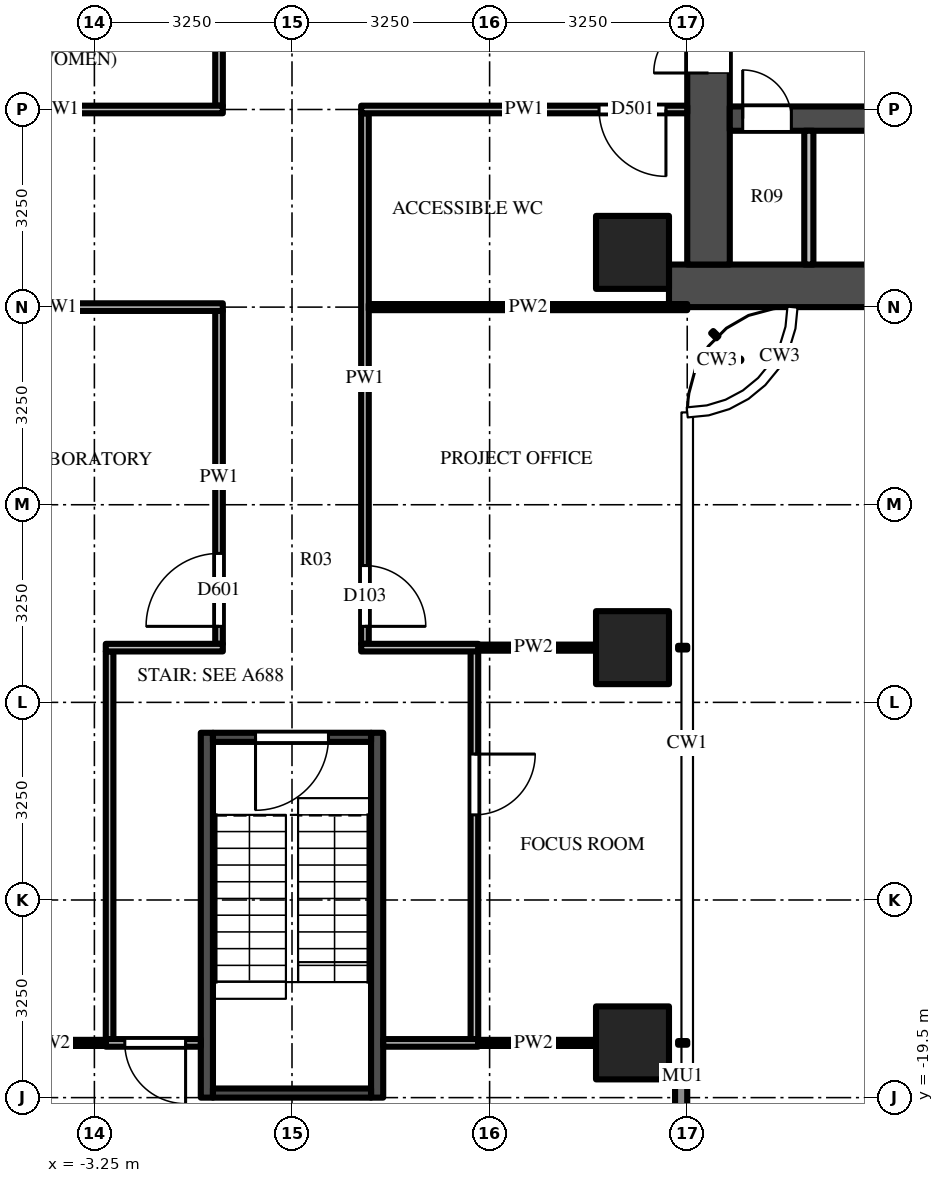
"""IFC4 building model, lengths in metres.
Left out: names, types, materials, properties, quantities, classifications, styles, units other than length and angle.
Written with IfcOpenShell. Run it as: python <this file> out.ifc"""

import sys

from ifc_helpers import new_model, si_unit, direction, frame, frame_2d, origin, origin_2d, place, context, subcontext, project, spatial, rectangle, extrude, source, transform, mapped, element, fill, save


model = new_model("IFC4")
c1 = context("Model", 3, precision=1e-05, world=origin(), true_north=direction((0.0, 1.0)))
c2 = subcontext(c1, "Body", "Model", "MODEL_VIEW")
j1 = project(units=[si_unit("LENGTHUNIT", "METRE"), si_unit("PLANEANGLEUNIT", "RADIAN")], contexts=[c1])
p1 = place(None, origin())
s1 = spatial("IfcSite", under=j1, at=p1, CompositionType="ELEMENT")
p2 = place(p1, origin())
s2 = spatial("IfcBuilding", under=s1, at=p2, CompositionType="ELEMENT")
p3 = place(p2, frame((0.0, 0.0, 197.1)))
s3 = spatial("IfcBuildingStorey", under=s2, at=p3, CompositionType="ELEMENT", Elevation=197.1)
m1 = source(origin(), c2, "Body", "SweptSolid", [
    extrude(rectangle(XDim=1.2, YDim=1.2, at=origin_2d()), origin(), (0.0, 0.0, 1.0), 3.9),
])
for number, where, z_axis, x_axis in (
    (1, (5.6, -5.6, 0.0), (0.0, 0.0, 1.0), (1.0, 0.0, 0.0)),
    (2, (5.6, -12.1, 0.0), (0.0, 0.0, 1.0), (1.0, 0.0, 0.0)),
    (3, (5.6, -18.6, 0.0), (0.0, 0.0, 1.0), (1.0, 0.0, 0.0)),
):
    element("IfcColumn", number, at=place(p3, frame(where, z_axis=z_axis, x_axis=x_axis)), inside=s3, PredefinedType="COLUMN", context=c2, shape_type="MappedRepresentation", body=[
        mapped(m1, transform((0.0, 0.0, 0.0))),
    ])
m2 = source(origin(), c2, "Body", "SweptSolid", [
    extrude(rectangle(XDim=16.55, YDim=0.7, at=frame_2d((8.275, 0.0))), origin(), (0.0, 0.0, 1.0), 3.7),
])
p4 = place(p3, frame((6.2, -6.15, 0.0), z_axis=(0.0, 0.0, 1.0), x_axis=(1.0, 0.0, 0.0)))
e4 = element("IfcWall", 4, at=p4, inside=s3, PredefinedType="SHEAR", context=c2, shape_type="MappedRepresentation", body=[
    mapped(m2, transform((0.0, 0.0, 0.0))),
])
m3 = source(origin(), c2, "Body", "SweptSolid", [
    extrude(rectangle(XDim=9.05, YDim=0.7, at=frame_2d((4.525, 0.0))), origin(), (0.0, 0.0, 1.0), 3.7),
])
p5 = place(p3, frame((6.85, -5.8, 0.0), z_axis=(0.0, 0.0, 1.0), x_axis=(0.0, 1.0, 0.0)))
e5 = element("IfcWall", 5, at=p5, inside=s3, PredefinedType="SHEAR", context=c2, shape_type="MappedRepresentation", body=[
    mapped(m3, transform((0.0, 0.0, 0.0))),
])
m4 = source(origin(), c2, "Body", "SweptSolid", [
    extrude(rectangle(XDim=1.8, YDim=2.1, at=frame_2d((0.9, 1.05))), frame((0.0, 0.36, 0.0), z_axis=(0.0, -1.0, 0.0), x_axis=(1.0, 0.0, 0.0)), (0.0, 0.0, 1.0), 0.72),
])
p6 = place(p5, frame((3.15, 0.0, 0.0)))
e6 = element("IfcOpeningElement", 6, at=p6, cuts=e5, PredefinedType="OPENING", context=c2, shape_type="MappedRepresentation", body=[
    mapped(m4, transform((0.0, 0.0, 0.0))),
])
m5 = source(origin(), c2, "Body", "SweptSolid", [
    extrude(rectangle(XDim=7.5, YDim=0.4, at=frame_2d((3.75, 0.0))), origin(), (0.0, 0.0, 1.0), 3.7),
])
p7 = place(p3, frame((7.2, -3.4, 0.0), z_axis=(0.0, 0.0, 1.0), x_axis=(1.0, 0.0, 0.0)))
e7 = element("IfcWall", 7, at=p7, inside=s3, PredefinedType="SHEAR", context=c2, shape_type="MappedRepresentation", body=[
    mapped(m5, transform((0.0, 0.0, 0.0))),
])
m6 = source(origin(), c2, "Body", "SweptSolid", [
    extrude(rectangle(XDim=0.8, YDim=2.1, at=frame_2d((0.4, 1.05))), frame((0.0, 0.21, 0.0), z_axis=(0.0, -1.0, 0.0), x_axis=(1.0, 0.0, 0.0)), (0.0, 0.0, 1.0), 0.42),
])
p8 = place(p7, frame((0.212, 0.0, 0.0)))
e8 = element("IfcOpeningElement", 8, at=p8, cuts=e7, PredefinedType="OPENING", context=c2, shape_type="MappedRepresentation", body=[
    mapped(m6, transform((0.0, 0.0, 0.0))),
])
m7 = source(origin(), c2, "Body", "SweptSolid", [
    extrude(rectangle(XDim=1.0, YDim=2.1, at=frame_2d((0.5, 1.05))), frame((0.0, 0.21, 0.0), z_axis=(0.0, -1.0, 0.0), x_axis=(1.0, 0.0, 0.0)), (0.0, 0.0, 1.0), 0.42),
])
p9 = place(p7, frame((3.05, 0.0, 0.0)))
e9 = element("IfcOpeningElement", 9, at=p9, cuts=e7, PredefinedType="OPENING", context=c2, shape_type="MappedRepresentation", body=[
    mapped(m7, transform((0.0, 0.0, 0.0))),
])
p10 = place(p7, frame((6.087, 0.0, 0.0)))
e10 = element("IfcOpeningElement", 10, at=p10, cuts=e7, PredefinedType="OPENING", context=c2, shape_type="MappedRepresentation", body=[
    mapped(m6, transform((0.0, 0.0, 0.0))),
])
m8 = source(origin(), c2, "Body", "SweptSolid", [
    extrude(rectangle(XDim=2.2, YDim=0.15, at=frame_2d((1.1, 0.0))), origin(), (0.0, 0.0, 1.0), 3.7),
])
p11 = place(p3, frame((8.5, -5.8, 0.0), z_axis=(0.0, 0.0, 1.0), x_axis=(0.0, 1.0, 0.0)))
e11 = element("IfcWall", 11, at=p11, inside=s3, PredefinedType="PARTITIONING", context=c2, shape_type="MappedRepresentation", body=[
    mapped(m8, transform((0.0, 0.0, 0.0))),
])
m9 = source(origin(), c2, "Body", "SweptSolid", [
    extrude(rectangle(XDim=6.0, YDim=0.2, at=frame_2d((3.0, 0.0))), origin(), (0.0, 0.0, 1.0), 3.7),
])
for number, where, z_axis, x_axis in (
    (12, (1.4, -13.5, 0.0), (0.0, 0.0, 1.0), (0.0, -1.0, 0.0)),
    (13, (-1.4, -13.5, 0.0), (0.0, 0.0, 1.0), (0.0, -1.0, 0.0)),
):
    element("IfcWall", number, at=place(p3, frame(where, z_axis=z_axis, x_axis=x_axis)), inside=s3, PredefinedType="SHEAR", context=c2, shape_type="MappedRepresentation", body=[
        mapped(m9, transform((0.0, 0.0, 0.0))),
    ])
m10 = source(origin(), c2, "Body", "SweptSolid", [
    extrude(rectangle(XDim=2.6, YDim=0.15, at=frame_2d((1.3, 0.0))), origin(), (0.0, 0.0, 1.0), 3.7),
])
p12 = place(p3, frame((1.3, -13.575, 0.0), z_axis=(0.0, 0.0, 1.0), x_axis=(-1.0, 0.0, 0.0)))
e14 = element("IfcWall", 14, at=p12, inside=s3, PredefinedType="SHEAR", context=c2, shape_type="MappedRepresentation", body=[
    mapped(m10, transform((0.0, 0.0, 0.0))),
])
m11 = source(origin(), c2, "Body", "SweptSolid", [
    extrude(rectangle(XDim=1.2, YDim=2.1, at=frame_2d((0.6, 1.05))), frame((0.0, 0.085, 0.0), z_axis=(0.0, -1.0, 0.0), x_axis=(1.0, 0.0, 0.0)), (0.0, 0.0, 1.0), 0.17),
])
p13 = place(p12, frame((0.7, 0.0, 0.0)))
e15 = element("IfcOpeningElement", 15, at=p13, cuts=e14, PredefinedType="OPENING", context=c2, shape_type="MappedRepresentation", body=[
    mapped(m11, transform((0.0, 0.0, 0.0))),
])
p14 = place(p3, frame((1.3, -19.425, 0.0), z_axis=(0.0, 0.0, 1.0), x_axis=(-1.0, 0.0, 0.0)))
e16 = element("IfcWall", 16, at=p14, inside=s3, PredefinedType="SHEAR", context=c2, shape_type="MappedRepresentation", body=[
    mapped(m10, transform((0.0, 0.0, 0.0))),
])
m12 = source(origin(), c2, "Body", "SweptSolid", [
    extrude(rectangle(XDim=3.0, YDim=0.2, at=frame_2d((1.5, 0.0))), origin(), (0.0, 0.0, 1.0), 3.7),
])
p15 = place(p3, frame((6.4, -22.175, 0.0), z_axis=(0.0, 0.0, 1.0), x_axis=(0.0, 1.0, 0.0)))
e17 = element("IfcWall", 17, at=p15, inside=s3, PredefinedType="SOLIDWALL", context=c2, shape_type="MappedRepresentation", body=[
    mapped(m12, transform((0.0, 0.0, 0.0))),
])
m13 = source(origin(), c2, "Body", "SweptSolid", [
    extrude(rectangle(XDim=1.8, YDim=2.4, at=frame_2d((0.9, 1.2))), frame((0.0, 0.11, 0.0), z_axis=(0.0, -1.0, 0.0), x_axis=(1.0, 0.0, 0.0)), (0.0, 0.0, 1.0), 0.22),
])
p16 = place(p15, frame((0.6, 0.0, 0.0)))
e18 = element("IfcOpeningElement", 18, at=p16, cuts=e17, PredefinedType="OPENING", context=c2, shape_type="MappedRepresentation", body=[
    mapped(m13, transform((0.0, 0.0, 0.0))),
])
m14 = source(origin(), c2, "Body", "SweptSolid", [
    extrude(rectangle(XDim=6.387, YDim=0.125, at=frame_2d((3.194, 0.0))), origin(), (0.0, 0.0, 1.0), 2.997),
])
p17 = place(p3, frame((-3.0, -18.55, 0.0), z_axis=(0.0, 0.0, 1.0), x_axis=(0.0, 1.0, 0.0)))
e19 = element("IfcWall", 19, at=p17, inside=s3, PredefinedType="PARTITIONING", context=c2, shape_type="MappedRepresentation", body=[
    mapped(m14, transform((0.0, 0.0, 0.0))),
])
m15 = source(origin(), c2, "Body", "SweptSolid", [
    extrude(rectangle(XDim=3.125, YDim=0.125, at=frame_2d((1.562, 0.0))), origin(), (0.0, 0.0, 1.0), 3.068),
])
p18 = place(p3, frame((-1.2, -0.062, 0.0), z_axis=(0.0, 0.0, 1.0), x_axis=(0.0, -1.0, 0.0)))
e20 = element("IfcWall", 20, at=p18, inside=s3, PredefinedType="PARTITIONING", context=c2, shape_type="MappedRepresentation", body=[
    mapped(m15, transform((0.0, 0.0, 0.0))),
])
m16 = source(origin(), c2, "Body", "SweptSolid", [
    extrude(rectangle(XDim=5.475, YDim=0.125, at=frame_2d((2.738, 0.0))), origin(), (0.0, 0.0, 1.0), 2.997),
])
p19 = place(p3, frame((-1.2, -12.038, 0.0), z_axis=(0.0, 0.0, 1.0), x_axis=(0.0, 1.0, 0.0)))
e21 = element("IfcWall", 21, at=p19, inside=s3, PredefinedType="PARTITIONING", context=c2, shape_type="MappedRepresentation", body=[
    mapped(m16, transform((0.0, 0.0, 0.0))),
])
m17 = source(origin(), c2, "Body", "SweptSolid", [
    extrude(rectangle(XDim=1.2, YDim=2.1, at=frame_2d((0.6, 1.05))), frame((0.0, 0.073, 0.0), z_axis=(0.0, -1.0, 0.0), x_axis=(1.0, 0.0, 0.0)), (0.0, 0.0, 1.0), 0.145),
])
p20 = place(p19, frame((0.288, 0.0, 0.0)))
e22 = element("IfcOpeningElement", 22, at=p20, cuts=e21, PredefinedType="OPENING", context=c2, shape_type="MappedRepresentation", body=[
    mapped(m17, transform((0.0, 0.0, 0.0))),
])
m18 = source(origin(), c2, "Body", "SweptSolid", [
    extrude(rectangle(XDim=8.725, YDim=0.125, at=frame_2d((4.363, 0.0))), origin(), (0.0, 0.0, 1.0), 2.997),
])
p21 = place(p3, frame((1.2, -3.312, 0.0), z_axis=(0.0, 0.0, 1.0), x_axis=(0.0, -1.0, 0.0)))
e23 = element("IfcWall", 23, at=p21, inside=s3, PredefinedType="PARTITIONING", context=c2, shape_type="MappedRepresentation", body=[
    mapped(m18, transform((0.0, 0.0, 0.0))),
])
m19 = source(origin(), c2, "Body", "SweptSolid", [
    extrude(rectangle(XDim=1.0, YDim=2.1, at=frame_2d((0.5, 1.05))), frame((0.0, 0.073, 0.0), z_axis=(0.0, -1.0, 0.0), x_axis=(1.0, 0.0, 0.0)), (0.0, 0.0, 1.0), 0.145),
])
p22 = place(p21, frame((7.438, 0.0, 0.0)))
e24 = element("IfcOpeningElement", 24, at=p22, cuts=e23, PredefinedType="OPENING", context=c2, shape_type="MappedRepresentation", body=[
    mapped(m19, transform((0.0, 0.0, 0.0))),
])
m20 = source(origin(), c2, "Body", "SweptSolid", [
    extrude(rectangle(XDim=6.4, YDim=0.125, at=frame_2d((3.2, 0.0))), origin(), (0.0, 0.0, 1.0), 2.997),
])
p23 = place(p3, frame((3.0, -12.15, 0.0), z_axis=(0.0, 0.0, 1.0), x_axis=(0.0, -1.0, 0.0)))
e25 = element("IfcWall", 25, at=p23, inside=s3, PredefinedType="PARTITIONING", context=c2, shape_type="MappedRepresentation", body=[
    mapped(m20, transform((0.0, 0.0, 0.0))),
])
p24 = place(p23, frame((1.7, 0.0, 0.0)))
e26 = element("IfcOpeningElement", 26, at=p24, cuts=e25, PredefinedType="OPENING", context=c2, shape_type="MappedRepresentation", body=[
    mapped(m19, transform((0.0, 0.0, 0.0))),
])
m21 = source(origin(), c2, "Body", "SweptSolid", [
    extrude(rectangle(XDim=2.062, YDim=0.1, at=frame_2d((1.031, 0.0))), origin(), (0.0, 0.0, 1.0), 3.223),
])
for number, where, z_axis, x_axis in (
    (27, (-5.0, -18.6, 0.0), (0.0, 0.0, 1.0), (1.0, 0.0, 0.0)),
    (28, (2.938, -18.6, 0.0), (0.0, 0.0, 1.0), (1.0, 0.0, 0.0)),
):
    element("IfcWall", number, at=place(p3, frame(where, z_axis=z_axis, x_axis=x_axis)), inside=s3, PredefinedType="PARTITIONING", context=c2, shape_type="MappedRepresentation", body=[
        mapped(m21, transform((0.0, 0.0, 0.0))),
    ])
m22 = source(origin(), c2, "Body", "SweptSolid", [
    extrude(rectangle(XDim=1.562, YDim=0.125, at=frame_2d((0.781, 0.0))), origin(), (0.0, 0.0, 1.0), 3.223),
])
p25 = place(p3, frame((-1.5, -18.6, 0.0), z_axis=(0.0, 0.0, 1.0), x_axis=(-1.0, 0.0, 0.0)))
e29 = element("IfcWall", 29, at=p25, inside=s3, PredefinedType="PARTITIONING", context=c2, shape_type="MappedRepresentation", body=[
    mapped(m22, transform((0.0, 0.0, 0.0))),
])
p26 = place(p25, frame((0.25, 0.0, 0.0)))
e30 = element("IfcOpeningElement", 30, at=p26, cuts=e29, PredefinedType="OPENING", context=c2, shape_type="MappedRepresentation", body=[
    mapped(m19, transform((0.0, 0.0, 0.0))),
])
p27 = place(p3, frame((3.062, -18.6, 0.0), z_axis=(0.0, 0.0, 1.0), x_axis=(-1.0, 0.0, 0.0)))
e31 = element("IfcWall", 31, at=p27, inside=s3, PredefinedType="PARTITIONING", context=c2, shape_type="MappedRepresentation", body=[
    mapped(m22, transform((0.0, 0.0, 0.0))),
])
m23 = source(origin(), c2, "Body", "SweptSolid", [
    extrude(rectangle(XDim=2.062, YDim=0.1, at=frame_2d((1.031, 0.0))), origin(), (0.0, 0.0, 1.0), 2.997),
])
p28 = place(p3, frame((2.938, -12.1, 0.0), z_axis=(0.0, 0.0, 1.0), x_axis=(1.0, 0.0, 0.0)))
e32 = element("IfcWall", 32, at=p28, inside=s3, PredefinedType="PARTITIONING", context=c2, shape_type="MappedRepresentation", body=[
    mapped(m23, transform((0.0, 0.0, 0.0))),
])
m24 = source(origin(), c2, "Body", "SweptSolid", [
    extrude(rectangle(XDim=1.925, YDim=0.125, at=frame_2d((0.962, 0.0))), origin(), (0.0, 0.0, 1.0), 2.997),
])
for number, where, z_axis, x_axis in (
    (33, (-3.062, -12.1, 0.0), (0.0, 0.0, 1.0), (1.0, 0.0, 0.0)),
    (34, (1.137, -12.1, 0.0), (0.0, 0.0, 1.0), (1.0, 0.0, 0.0)),
):
    element("IfcWall", number, at=place(p3, frame(where, z_axis=z_axis, x_axis=x_axis)), inside=s3, PredefinedType="PARTITIONING", context=c2, shape_type="MappedRepresentation", body=[
        mapped(m24, transform((0.0, 0.0, 0.0))),
    ])
m25 = source(origin(), c2, "Body", "SweptSolid", [
    extrude(rectangle(XDim=5.238, YDim=0.1, at=frame_2d((2.619, 0.0))), origin(), (0.0, 0.0, 1.0), 2.78),
])
p29 = place(p3, frame((1.262, -6.5, 0.0), z_axis=(0.0, 0.0, 1.0), x_axis=(1.0, 0.0, 0.0)))
e35 = element("IfcWall", 35, at=p29, inside=s3, PredefinedType="PARTITIONING", context=c2, shape_type="MappedRepresentation", body=[
    mapped(m25, transform((0.0, 0.0, 0.0))),
])
m26 = source(origin(), c2, "Body", "SweptSolid", [
    extrude(rectangle(XDim=5.425, YDim=0.125, at=frame_2d((2.712, 0.0))), origin(), (0.0, 0.0, 1.0), 2.78),
])
p30 = place(p3, frame((-1.137, -6.5, 0.0), z_axis=(0.0, 0.0, 1.0), x_axis=(-1.0, 0.0, 0.0)))
e36 = element("IfcWall", 36, at=p30, inside=s3, PredefinedType="PARTITIONING", context=c2, shape_type="MappedRepresentation", body=[
    mapped(m26, transform((0.0, 0.0, 0.0))),
])
m27 = source(origin(), c2, "Body", "SweptSolid", [
    extrude(rectangle(XDim=5.363, YDim=0.125, at=frame_2d((2.681, 0.0))), origin(), (0.0, 0.0, 1.0), 2.997),
])
p31 = place(p3, frame((-1.137, -3.25, 0.0), z_axis=(0.0, 0.0, 1.0), x_axis=(-1.0, 0.0, 0.0)))
e37 = element("IfcWall", 37, at=p31, inside=s3, PredefinedType="PARTITIONING", context=c2, shape_type="MappedRepresentation", body=[
    mapped(m27, transform((0.0, 0.0, 0.0))),
])
p32 = place(p31, frame((4.012, 0.0, 0.0)))
e38 = element("IfcOpeningElement", 38, at=p32, cuts=e37, PredefinedType="OPENING", context=c2, shape_type="MappedRepresentation", body=[
    mapped(m19, transform((0.0, 0.0, 0.0))),
])
p33 = place(p3, frame((6.5, -3.25, 0.0), z_axis=(0.0, 0.0, 1.0), x_axis=(-1.0, 0.0, 0.0)))
e39 = element("IfcWall", 39, at=p33, inside=s3, PredefinedType="PARTITIONING", context=c2, shape_type="MappedRepresentation", body=[
    mapped(m27, transform((0.0, 0.0, 0.0))),
])
m28 = source(origin(), c2, "Body", "SweptSolid", [
    extrude(rectangle(XDim=1.1, YDim=2.1, at=frame_2d((0.55, 1.05))), frame((0.0, 0.073, 0.0), z_axis=(0.0, -1.0, 0.0), x_axis=(1.0, 0.0, 0.0)), (0.0, 0.0, 1.0), 0.145),
])
p34 = place(p33, frame((0.35, 0.0, 0.0)))
e40 = element("IfcOpeningElement", 40, at=p34, cuts=e39, PredefinedType="OPENING", context=c2, shape_type="MappedRepresentation", body=[
    mapped(m28, transform((0.0, 0.0, 0.0))),
])
m29 = source(origin(), c2, "Body", "SweptSolid", [
    extrude(rectangle(XDim=1.8, YDim=2.1, at=frame_2d((0.9, 1.05))), frame((0.0, -0.275, 0.0), z_axis=(0.0, -1.0, 0.0), x_axis=(1.0, 0.0, 0.0)), (0.0, 0.0, 1.0), 0.05),
])
p35 = place(p6, origin())
e41 = element("IfcDoor", 41, at=p35, inside=s3, OperationType="DOUBLE_DOOR_SINGLE_SWING", PredefinedType="DOOR", context=c2, shape_type="MappedRepresentation", body=[
    mapped(m29, transform((0.0, 0.0, 0.0))),
])
fill(e6, e41)
m30 = source(origin(), c2, "Body", "SweptSolid", [
    extrude(rectangle(XDim=0.8, YDim=2.1, at=frame_2d((0.4, 1.05))), frame((0.0, 0.025, 0.0), z_axis=(0.0, -1.0, 0.0), x_axis=(1.0, 0.0, 0.0)), (0.0, 0.0, 1.0), 0.05),
])
p36 = place(p8, origin())
e42 = element("IfcDoor", 42, at=p36, inside=s3, OperationType="SINGLE_SWING_LEFT", PredefinedType="DOOR", context=c2, shape_type="MappedRepresentation", body=[
    mapped(m30, transform((0.0, 0.0, 0.0))),
])
fill(e8, e42)
m31 = source(origin(), c2, "Body", "SweptSolid", [
    extrude(rectangle(XDim=1.2, YDim=2.1, at=frame_2d((0.6, 1.05))), frame((0.0, 0.025, 0.0), z_axis=(0.0, -1.0, 0.0), x_axis=(1.0, 0.0, 0.0)), (0.0, 0.0, 1.0), 0.05),
])
p37 = place(p13, origin())
e43 = element("IfcDoor", 43, at=p37, inside=s3, OperationType="SINGLE_SWING_RIGHT", PredefinedType="DOOR", context=c2, shape_type="MappedRepresentation", body=[
    mapped(m31, transform((0.0, 0.0, 0.0))),
])
fill(e15, e43)
m32 = source(origin(), c2, "Body", "SweptSolid", [
    extrude(rectangle(XDim=1.0, YDim=2.1, at=frame_2d((0.5, 1.05))), frame((0.0, 0.025, 0.0), z_axis=(0.0, -1.0, 0.0), x_axis=(1.0, 0.0, 0.0)), (0.0, 0.0, 1.0), 0.05),
])
p38 = place(p26, origin())
e44 = element("IfcDoor", 44, at=p38, inside=s3, OperationType="SINGLE_SWING_LEFT", PredefinedType="DOOR", context=c2, shape_type="MappedRepresentation", body=[
    mapped(m32, transform((0.0, 0.0, 0.0))),
])
fill(e30, e44)
p39 = place(p24, origin())
e45 = element("IfcDoor", 45, at=p39, inside=s3, OperationType="SINGLE_SWING_LEFT", PredefinedType="DOOR", context=c2, shape_type="MappedRepresentation", body=[
    mapped(m32, transform((0.0, 0.0, 0.0))),
])
fill(e26, e45)
p40 = place(p22, origin())
e46 = element("IfcDoor", 46, at=p40, inside=s3, OperationType="SINGLE_SWING_RIGHT", PredefinedType="DOOR", context=c2, shape_type="MappedRepresentation", body=[
    mapped(m32, transform((0.0, 0.0, 0.0))),
])
fill(e24, e46)
p41 = place(p20, origin())
e47 = element("IfcDoor", 47, at=p41, inside=s3, OperationType="SINGLE_SWING_LEFT", PredefinedType="DOOR", context=c2, shape_type="MappedRepresentation", body=[
    mapped(m31, transform((0.0, 0.0, 0.0))),
])
fill(e22, e47)
m33 = source(origin(), c2, "Body", "SweptSolid", [
    extrude(rectangle(XDim=1.1, YDim=2.1, at=frame_2d((0.55, 1.05))), frame((0.0, 0.025, 0.0), z_axis=(0.0, -1.0, 0.0), x_axis=(1.0, 0.0, 0.0)), (0.0, 0.0, 1.0), 0.05),
])
p42 = place(p34, origin())
e48 = element("IfcDoor", 48, at=p42, inside=s3, OperationType="SINGLE_SWING_LEFT", PredefinedType="DOOR", context=c2, shape_type="MappedRepresentation", body=[
    mapped(m33, transform((0.0, 0.0, 0.0))),
])
fill(e40, e48)
save(model, sys.argv[1])
